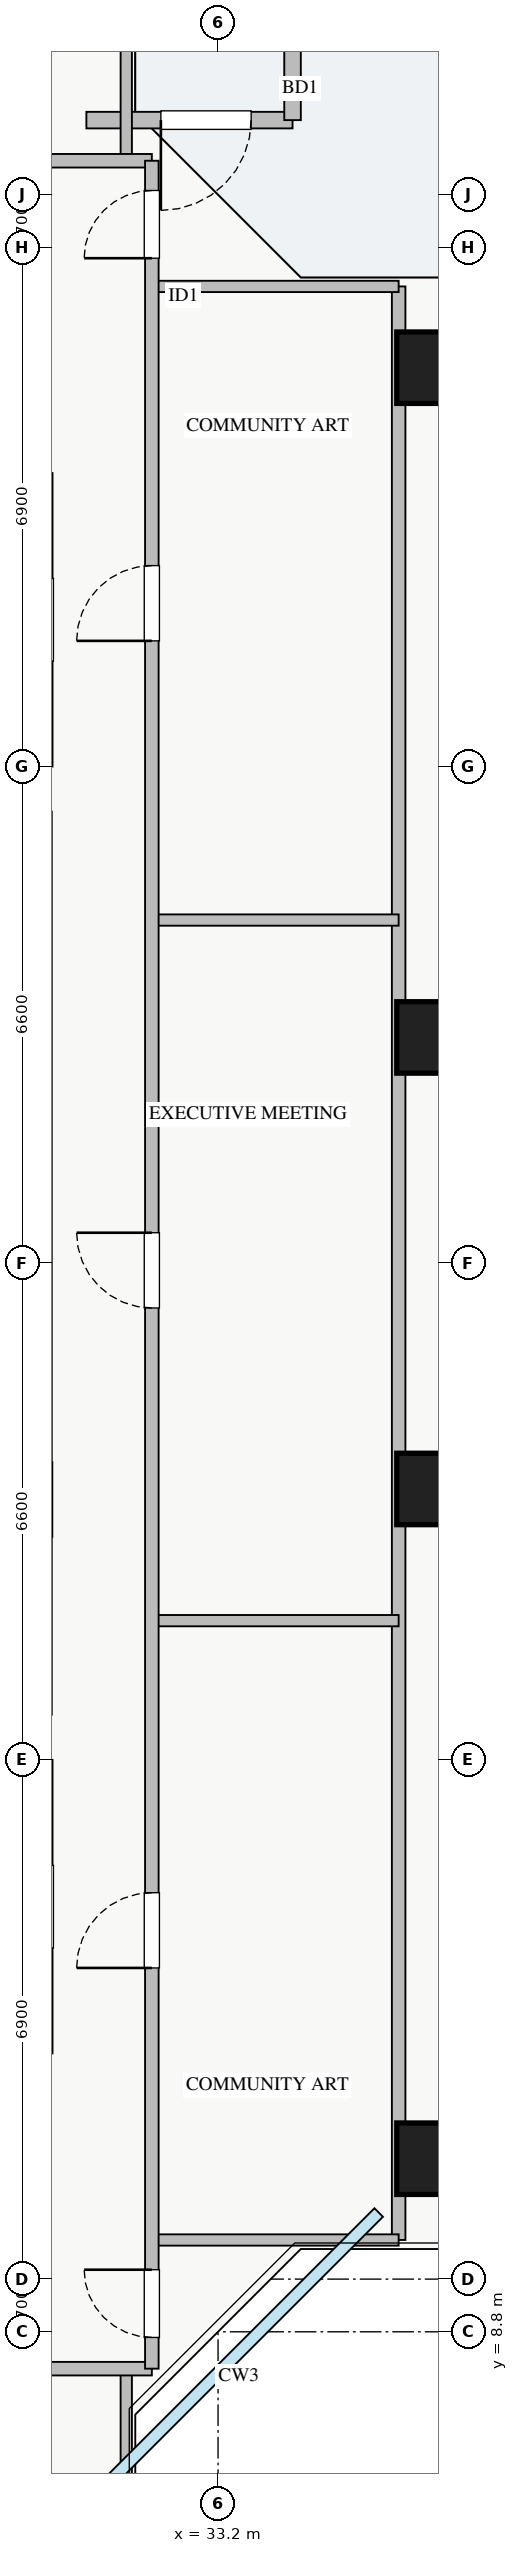
"""IFC4 building model, lengths in metres.
Left out: names, types, materials, properties, quantities, classifications, styles, units other than length and angle.
Written with IfcOpenShell. Run it as: python <this file> out.ifc"""

import sys

from ifc_helpers import new_model, si_unit, direction, frame, frame_2d, origin, origin_2d, place, context, subcontext, project, spatial, rectangle, extrude, source, transform, mapped, element, fill, save


model = new_model("IFC4")
c1 = context("Model", 3, precision=1e-05, world=origin(), true_north=direction((0.0, 1.0)))
c2 = subcontext(c1, "Body", "Model", "MODEL_VIEW")
j1 = project(units=[si_unit("LENGTHUNIT", "METRE"), si_unit("PLANEANGLEUNIT", "RADIAN")], contexts=[c1])
p1 = place(None, origin())
s1 = spatial("IfcSite", under=j1, at=p1, CompositionType="ELEMENT")
p2 = place(p1, origin())
s2 = spatial("IfcBuilding", under=s1, at=p2, CompositionType="ELEMENT")
p3 = place(p2, frame((0.0, 0.0, 173.0)))
s3 = spatial("IfcBuildingStorey", under=s2, at=p3, CompositionType="ELEMENT", Elevation=173.0)
m1 = source(origin(), c2, "Body", "SweptSolid", [
    extrude(rectangle(XDim=0.95, YDim=0.95, at=origin_2d()), origin(), (0.0, 0.0, 1.0), 3.25),
])
for number, where, z_axis, x_axis in (
    (1, (36.05, 11.1, 0.0), (0.0, 0.0, 1.0), (1.0, 0.0, 0.0)),
    (2, (36.05, 20.0, 0.0), (0.0, 0.0, 1.0), (1.0, 0.0, 0.0)),
    (3, (36.05, 26.0, 0.0), (0.0, 0.0, 1.0), (1.0, 0.0, 0.0)),
    (4, (36.05, 34.9, 0.0), (0.0, 0.0, 1.0), (1.0, 0.0, 0.0)),
):
    element("IfcColumn", number, at=place(p3, frame(where, z_axis=z_axis, x_axis=x_axis)), inside=s3, PredefinedType="COLUMN", context=c2, shape_type="MappedRepresentation", body=[
        mapped(m1, transform((0.0, 0.0, 0.0), x_axis=(1.0, 0.0, 0.0), y_axis=(0.0, 1.0, 0.0), z_axis=(0.0, 0.0, 1.0), scale=1.0)),
    ])
p4 = place(p3, frame((31.45, 38.19, 0.0), z_axis=(0.0, 0.0, 1.0), x_axis=(1.0, 0.0, 0.0)))
e5 = element("IfcWall", 5, at=p4, inside=s3, PredefinedType="STANDARD", context=c2, shape_type="SweptSolid", body=[
    extrude(rectangle(XDim=2.74, YDim=0.22, at=frame_2d((1.37, 0.0))), origin(), (0.0, 0.0, 1.0), 2.54),
])
p5 = place(p4, frame((0.99, 0.0, 0.0)))
e6 = element("IfcOpeningElement", 6, at=p5, cuts=e5, PredefinedType="OPENING", context=c2, shape_type="SweptSolid", body=[
    extrude(rectangle(XDim=1.2, YDim=2.1, at=frame_2d((0.6, 1.05))), frame((0.0, 0.12, 0.0), z_axis=(0.0, -1.0, 0.0), x_axis=(1.0, 0.0, 0.0)), (0.0, 0.0, 1.0), 0.24),
])
p6 = place(p3, frame((34.19, 38.19, 0.0), z_axis=(0.0, 0.0, 1.0), x_axis=(0.0, 1.0, 0.0)))
e7 = element("IfcWall", 7, at=p6, inside=s3, PredefinedType="STANDARD", context=c2, shape_type="SweptSolid", body=[
    extrude(rectangle(XDim=2.86, YDim=0.22, at=frame_2d((1.43, 0.0))), origin(), (0.0, 0.0, 1.0), 2.54),
])
p7 = place(p3, frame((35.6, 10.02, 0.0), z_axis=(0.0, 0.0, 1.0), x_axis=(0.0, 1.0, 0.0)))
e8 = element("IfcWall", 8, at=p7, inside=s3, PredefinedType="PARTITIONING", context=c2, shape_type="SweptSolid", body=[
    extrude(rectangle(XDim=25.96, YDim=0.18, at=frame_2d((12.98, 0.0))), origin(), (0.0, 0.0, 1.0), 3.0),
])
p8 = place(p3, frame((31.98, 37.65, 0.0), z_axis=(0.0, 0.0, 1.0), x_axis=(0.0, 1.0, 0.0)))
e9 = element("IfcWall", 9, at=p8, inside=s3, PredefinedType="PARTITIONING", context=c2, shape_type="SweptSolid", body=[
    extrude(rectangle(XDim=3.0, YDim=0.15, at=frame_2d((1.5, 0.0))), origin(), (0.0, 0.0, 1.0), 3.0),
])
p9 = place(p3, frame((8.78, 37.65, 0.0), z_axis=(0.0, 0.0, 1.0), x_axis=(1.0, 0.0, 0.0)))
e10 = element("IfcWall", 10, at=p9, inside=s3, PredefinedType="PARTITIONING", context=c2, shape_type="SweptSolid", body=[
    extrude(rectangle(XDim=23.54, YDim=0.18, at=frame_2d((11.77, 0.0))), origin(), (0.0, 0.0, 1.0), 3.0),
])
p10 = place(p9, frame((4.66, 0.0, 0.0)))
e11 = element("IfcOpeningElement", 11, at=p10, cuts=e10, PredefinedType="OPENING", context=c2, shape_type="SweptSolid", body=[
    extrude(rectangle(XDim=1.0, YDim=2.05, at=frame_2d((0.5, 1.025))), frame((0.0, 0.1, 0.0), z_axis=(0.0, -1.0, 0.0), x_axis=(1.0, 0.0, 0.0)), (0.0, 0.0, 1.0), 0.2),
])
p11 = place(p9, frame((16.26, 0.0, 0.0)))
e12 = element("IfcOpeningElement", 12, at=p11, cuts=e10, PredefinedType="OPENING", context=c2, shape_type="SweptSolid", body=[
    extrude(rectangle(XDim=1.0, YDim=2.05, at=frame_2d((0.5, 1.025))), frame((0.0, 0.1, 0.0), z_axis=(0.0, -1.0, 0.0), x_axis=(1.0, 0.0, 0.0)), (0.0, 0.0, 1.0), 0.2),
])
p12 = place(p3, frame((31.98, 5.35, 0.0), z_axis=(0.0, 0.0, 1.0), x_axis=(0.0, 1.0, 0.0)))
e13 = element("IfcWall", 13, at=p12, inside=s3, PredefinedType="PARTITIONING", context=c2, shape_type="SweptSolid", body=[
    extrude(rectangle(XDim=2.96, YDim=0.15, at=frame_2d((1.48, 0.0))), origin(), (0.0, 0.0, 1.0), 3.0),
])
p13 = place(p3, frame((8.78, 8.31, 0.0), z_axis=(0.0, 0.0, 1.0), x_axis=(1.0, 0.0, 0.0)))
e14 = element("IfcWall", 14, at=p13, inside=s3, PredefinedType="PARTITIONING", context=c2, shape_type="SweptSolid", body=[
    extrude(rectangle(XDim=23.54, YDim=0.18, at=frame_2d((11.77, 0.0))), origin(), (0.0, 0.0, 1.0), 3.0),
])
p14 = place(p13, frame((2.79, 0.0, 0.0)))
e15 = element("IfcOpeningElement", 15, at=p14, cuts=e14, PredefinedType="OPENING", context=c2, shape_type="SweptSolid", body=[
    extrude(rectangle(XDim=1.0, YDim=2.05, at=frame_2d((0.5, 1.025))), frame((0.0, 0.1, 0.0), z_axis=(0.0, -1.0, 0.0), x_axis=(1.0, 0.0, 0.0)), (0.0, 0.0, 1.0), 0.2),
])
p15 = place(p13, frame((7.95, 0.0, 0.0)))
e16 = element("IfcOpeningElement", 16, at=p15, cuts=e14, PredefinedType="OPENING", context=c2, shape_type="SweptSolid", body=[
    extrude(rectangle(XDim=1.0, YDim=2.05, at=frame_2d((0.5, 1.025))), frame((0.0, 0.1, 0.0), z_axis=(0.0, -1.0, 0.0), x_axis=(1.0, 0.0, 0.0)), (0.0, 0.0, 1.0), 0.2),
])
p16 = place(p13, frame((13.36, 0.0, 0.0)))
e17 = element("IfcOpeningElement", 17, at=p16, cuts=e14, PredefinedType="OPENING", context=c2, shape_type="SweptSolid", body=[
    extrude(rectangle(XDim=1.0, YDim=2.05, at=frame_2d((0.5, 1.025))), frame((0.0, 0.1, 0.0), z_axis=(0.0, -1.0, 0.0), x_axis=(1.0, 0.0, 0.0)), (0.0, 0.0, 1.0), 0.2),
])
p17 = place(p13, frame((19.8, 0.0, 0.0)))
e18 = element("IfcOpeningElement", 18, at=p17, cuts=e14, PredefinedType="OPENING", context=c2, shape_type="SweptSolid", body=[
    extrude(rectangle(XDim=1.0, YDim=2.05, at=frame_2d((0.5, 1.025))), frame((0.0, 0.1, 0.0), z_axis=(0.0, -1.0, 0.0), x_axis=(1.0, 0.0, 0.0)), (0.0, 0.0, 1.0), 0.2),
])
for number, where, z_axis, x_axis in (
    (19, (32.32, 35.98, 0.0), (0.0, 0.0, 1.0), (1.0, 0.0, 0.0)),
    (20, (32.32, 10.02, 0.0), (0.0, 0.0, 1.0), (1.0, 0.0, 0.0)),
):
    element("IfcWall", number, at=place(p3, frame(where, z_axis=z_axis, x_axis=x_axis)), inside=s3, PredefinedType="PARTITIONING", context=c2, shape_type="SweptSolid", body=[
        extrude(rectangle(XDim=3.28, YDim=0.15, at=frame_2d((1.64, 0.0))), origin(), (0.0, 0.0, 1.0), 3.0),
    ])
p18 = place(p3, frame((32.32, 18.25, 0.0), z_axis=(0.0, 0.0, 1.0), x_axis=(1.0, 0.0, 0.0)))
e21 = element("IfcWall", 21, at=p18, inside=s3, PredefinedType="PARTITIONING", context=c2, shape_type="SweptSolid", body=[
    extrude(rectangle(XDim=3.28, YDim=0.15, at=frame_2d((1.64, 0.0))), origin(), (0.0, 0.0, 1.0), 2.795),
])
p19 = place(p3, frame((32.32, 27.56, 0.0), z_axis=(0.0, 0.0, 1.0), x_axis=(1.0, 0.0, 0.0)))
e22 = element("IfcWall", 22, at=p19, inside=s3, PredefinedType="PARTITIONING", context=c2, shape_type="SweptSolid", body=[
    extrude(rectangle(XDim=3.28, YDim=0.15, at=frame_2d((1.64, 0.0))), origin(), (0.0, 0.0, 1.0), 3.0),
])
p20 = place(p3, frame((32.32, 8.31, 0.0), z_axis=(0.0, 0.0, 1.0), x_axis=(0.0, 1.0, 0.0)))
e23 = element("IfcWall", 23, at=p20, inside=s3, PredefinedType="PARTITIONING", context=c2, shape_type="SweptSolid", body=[
    extrude(rectangle(XDim=29.34, YDim=0.18, at=frame_2d((14.67, 0.0))), origin(), (0.0, 0.0, 1.0), 3.0),
])
p21 = place(p20, frame((28.045, 0.0, 0.0)))
e24 = element("IfcOpeningElement", 24, at=p21, cuts=e23, PredefinedType="OPENING", context=c2, shape_type="SweptSolid", body=[
    extrude(rectangle(XDim=0.9, YDim=2.05, at=frame_2d((0.45, 1.025))), frame((0.0, 0.1, 0.0), z_axis=(0.0, -1.0, 0.0), x_axis=(1.0, 0.0, 0.0)), (0.0, 0.0, 1.0), 0.2),
])
p22 = place(p20, frame((0.415, 0.0, 0.0)))
e25 = element("IfcOpeningElement", 25, at=p22, cuts=e23, PredefinedType="OPENING", context=c2, shape_type="SweptSolid", body=[
    extrude(rectangle(XDim=0.9, YDim=2.05, at=frame_2d((0.45, 1.025))), frame((0.0, 0.1, 0.0), z_axis=(0.0, -1.0, 0.0), x_axis=(1.0, 0.0, 0.0)), (0.0, 0.0, 1.0), 0.2),
])
p23 = place(p20, frame((5.325, 0.0, 0.0)))
e26 = element("IfcOpeningElement", 26, at=p23, cuts=e23, PredefinedType="OPENING", context=c2, shape_type="SweptSolid", body=[
    extrude(rectangle(XDim=1.0, YDim=2.05, at=frame_2d((0.5, 1.025))), frame((0.0, 0.1, 0.0), z_axis=(0.0, -1.0, 0.0), x_axis=(1.0, 0.0, 0.0)), (0.0, 0.0, 1.0), 0.2),
])
p24 = place(p20, frame((14.095, 0.0, 0.0)))
e27 = element("IfcOpeningElement", 27, at=p24, cuts=e23, PredefinedType="OPENING", context=c2, shape_type="SweptSolid", body=[
    extrude(rectangle(XDim=1.0, YDim=2.05, at=frame_2d((0.5, 1.025))), frame((0.0, 0.1, 0.0), z_axis=(0.0, -1.0, 0.0), x_axis=(1.0, 0.0, 0.0)), (0.0, 0.0, 1.0), 0.2),
])
p25 = place(p20, frame((22.96, 0.0, 0.0)))
e28 = element("IfcOpeningElement", 28, at=p25, cuts=e23, PredefinedType="OPENING", context=c2, shape_type="SweptSolid", body=[
    extrude(rectangle(XDim=1.0, YDim=2.05, at=frame_2d((0.5, 1.025))), frame((0.0, 0.1, 0.0), z_axis=(0.0, -1.0, 0.0), x_axis=(1.0, 0.0, 0.0)), (0.0, 0.0, 1.0), 0.2),
])
m2 = source(origin(), c2, "Body", "SweptSolid", [
    extrude(rectangle(XDim=1.2, YDim=2.1, at=frame_2d((0.6, 1.05))), frame((0.0, 0.025, 0.0), z_axis=(0.0, -1.0, 0.0), x_axis=(1.0, 0.0, 0.0)), (0.0, 0.0, 1.0), 0.05),
])
p26 = place(p5, frame((1.2, 0.0, 0.0), z_axis=(0.0, 0.0, 1.0), x_axis=(-1.0, 0.0, 0.0)))
e29 = element("IfcDoor", 29, at=p26, inside=s3, OperationType="SINGLE_SWING_LEFT", PredefinedType="DOOR", context=c2, shape_type="MappedRepresentation", body=[
    mapped(m2, transform((0.0, 0.0, 0.0), x_axis=(1.0, 0.0, 0.0), y_axis=(0.0, 1.0, 0.0), z_axis=(0.0, 0.0, 1.0), scale=1.0)),
])
fill(e6, e29)
m3 = source(origin(), c2, "Body", "SweptSolid", [
    extrude(rectangle(XDim=0.9, YDim=2.05, at=frame_2d((0.45, 1.025))), frame((0.0, 0.025, 0.0), z_axis=(0.0, -1.0, 0.0), x_axis=(1.0, 0.0, 0.0)), (0.0, 0.0, 1.0), 0.05),
])
p27 = place(p21, origin())
e30 = element("IfcDoor", 30, at=p27, inside=s3, OperationType="SINGLE_SWING_LEFT", PredefinedType="DOOR", context=c2, shape_type="MappedRepresentation", body=[
    mapped(m3, transform((0.0, 0.0, 0.0), x_axis=(1.0, 0.0, 0.0), y_axis=(0.0, 1.0, 0.0), z_axis=(0.0, 0.0, 1.0), scale=1.0)),
])
fill(e24, e30)
p28 = place(p22, origin())
e31 = element("IfcDoor", 31, at=p28, inside=s3, OperationType="SINGLE_SWING_RIGHT", PredefinedType="DOOR", context=c2, shape_type="MappedRepresentation", body=[
    mapped(m3, transform((0.0, 0.0, 0.0), x_axis=(1.0, 0.0, 0.0), y_axis=(0.0, 1.0, 0.0), z_axis=(0.0, 0.0, 1.0), scale=1.0)),
])
fill(e25, e31)
m4 = source(origin(), c2, "Body", "SweptSolid", [
    extrude(rectangle(XDim=1.0, YDim=2.05, at=frame_2d((0.5, 1.025))), frame((0.0, 0.025, 0.0), z_axis=(0.0, -1.0, 0.0), x_axis=(1.0, 0.0, 0.0)), (0.0, 0.0, 1.0), 0.05),
])
p29 = place(p23, origin())
e32 = element("IfcDoor", 32, at=p29, inside=s3, OperationType="SINGLE_SWING_LEFT", PredefinedType="DOOR", context=c2, shape_type="MappedRepresentation", body=[
    mapped(m4, transform((0.0, 0.0, 0.0), x_axis=(1.0, 0.0, 0.0), y_axis=(0.0, 1.0, 0.0), z_axis=(0.0, 0.0, 1.0), scale=1.0)),
])
fill(e26, e32)
p30 = place(p24, origin())
e33 = element("IfcDoor", 33, at=p30, inside=s3, OperationType="SINGLE_SWING_RIGHT", PredefinedType="DOOR", context=c2, shape_type="MappedRepresentation", body=[
    mapped(m4, transform((0.0, 0.0, 0.0), x_axis=(1.0, 0.0, 0.0), y_axis=(0.0, 1.0, 0.0), z_axis=(0.0, 0.0, 1.0), scale=1.0)),
])
fill(e27, e33)
p31 = place(p25, origin())
e34 = element("IfcDoor", 34, at=p31, inside=s3, OperationType="SINGLE_SWING_LEFT", PredefinedType="DOOR", context=c2, shape_type="MappedRepresentation", body=[
    mapped(m4, transform((0.0, 0.0, 0.0), x_axis=(1.0, 0.0, 0.0), y_axis=(0.0, 1.0, 0.0), z_axis=(0.0, 0.0, 1.0), scale=1.0)),
])
fill(e28, e34)
save(model, sys.argv[1])
